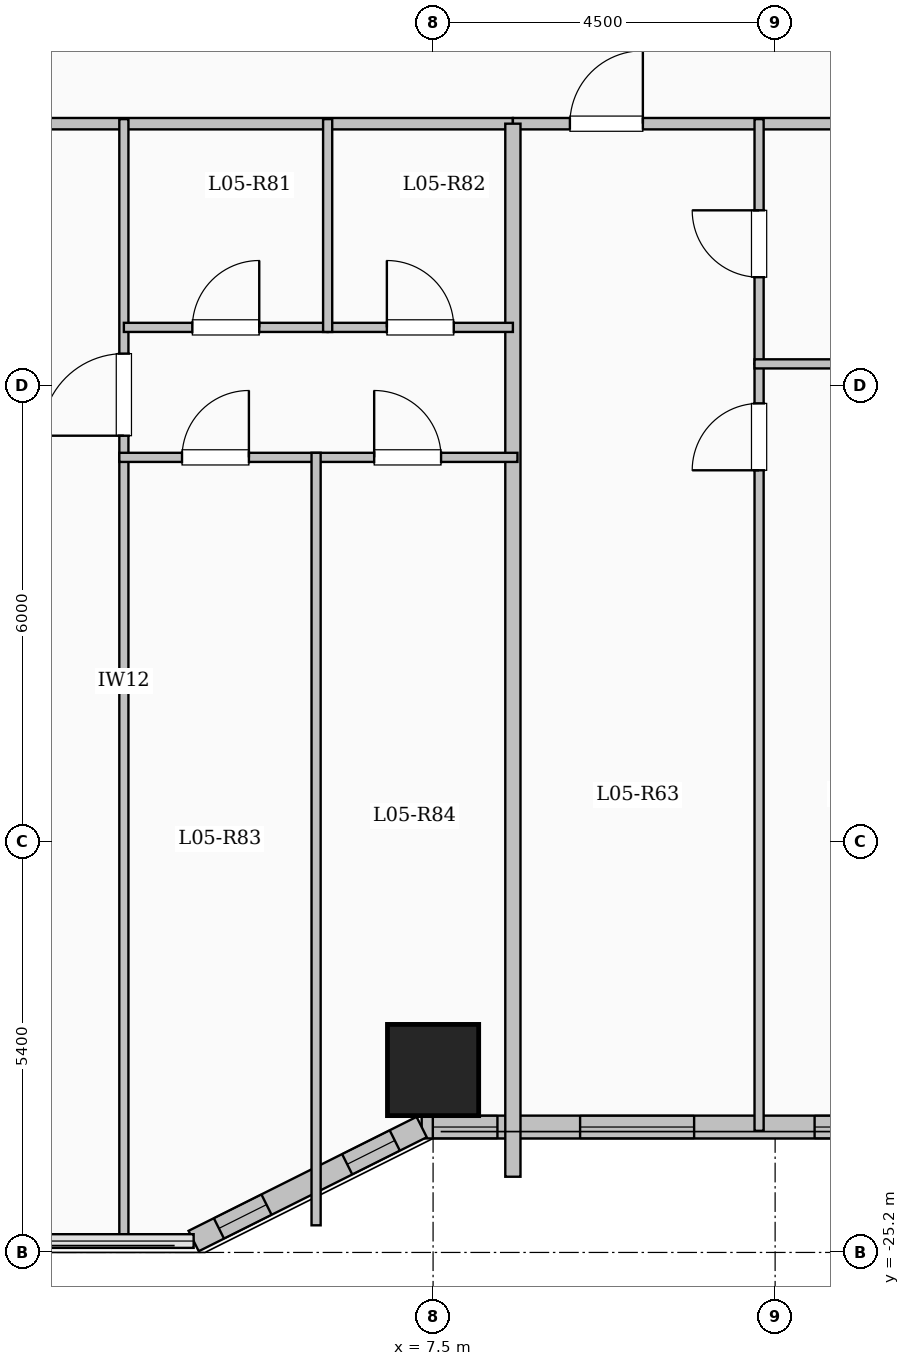
"""IFC4 building model, lengths in metres.
Left out: names, types, materials, properties, quantities, classifications, styles, units other than length and angle.
Written with IfcOpenShell. Run it as: python <this file> out.ifc"""

import sys

from ifc_helpers import new_model, si_unit, direction, frame, frame_2d, origin, origin_2d, place, context, subcontext, project, spatial, rectangle, extrude, element, fill, save


model = new_model("IFC4")
c1 = context("Model", 3, precision=1e-05, world=origin(), true_north=direction((0.0, 1.0)))
c2 = subcontext(c1, "Body", "Model", "MODEL_VIEW")
j1 = project(units=[si_unit("LENGTHUNIT", "METRE"), si_unit("PLANEANGLEUNIT", "RADIAN")], contexts=[c1])
p1 = place(None, origin())
s1 = spatial("IfcSite", under=j1, at=p1, CompositionType="ELEMENT")
p2 = place(p1, origin())
s2 = spatial("IfcBuilding", under=s1, at=p2, CompositionType="ELEMENT")
p3 = place(p2, frame((0.0, 0.0, 24.0)))
s3 = spatial("IfcBuildingStorey", under=s2, at=p3, CompositionType="ELEMENT", Elevation=24.0)
p4 = place(p3, frame((7.5, -22.8, 0.0), z_axis=(0.0, 0.0, 1.0), x_axis=(1.0, 0.0, 0.0)))
e1 = element("IfcColumn", 1, at=p4, inside=s3, PredefinedType="COLUMN", context=c2, shape_type="SweptSolid", body=[
    extrude(rectangle(XDim=1.2, YDim=1.2, at=origin_2d()), origin(), (0.0, 0.0, 1.0), 3.35),
])
p5 = place(p3, frame((22.65, -23.55, 0.0), z_axis=(0.0, 0.0, 1.0), x_axis=(-1.0, 0.0, 0.0)))
e2 = element("IfcWall", 2, at=p5, inside=s3, PredefinedType="SOLIDWALL", context=c2, shape_type="SweptSolid", body=[
    extrude(rectangle(XDim=15.3, YDim=0.3, at=frame_2d((7.65, 0.0))), origin(), (0.0, 0.0, 1.0), 3.1),
])
p6 = place(p5, frame((0.321, 0.0, 0.95)))
e3 = element("IfcOpeningElement", 3, at=p6, cuts=e2, PredefinedType="OPENING", context=c2, shape_type="SweptSolid", body=[
    extrude(rectangle(XDim=1.0, YDim=1.5, at=frame_2d((0.5, 0.75))), frame((0.0, 0.16, 0.0), z_axis=(0.0, -1.0, 0.0), x_axis=(1.0, 0.0, 0.0)), (0.0, 0.0, 1.0), 0.32),
])
p7 = place(p5, frame((2.031, 0.0, 0.95)))
e4 = element("IfcOpeningElement", 4, at=p7, cuts=e2, PredefinedType="OPENING", context=c2, shape_type="SweptSolid", body=[
    extrude(rectangle(XDim=0.85, YDim=1.5, at=frame_2d((0.425, 0.75))), frame((0.0, 0.16, 0.0), z_axis=(0.0, -1.0, 0.0), x_axis=(1.0, 0.0, 0.0)), (0.0, 0.0, 1.0), 0.32),
])
p8 = place(p5, frame((3.562, 0.0, 0.95)))
e5 = element("IfcOpeningElement", 5, at=p8, cuts=e2, PredefinedType="OPENING", context=c2, shape_type="SweptSolid", body=[
    extrude(rectangle(XDim=0.85, YDim=1.5, at=frame_2d((0.425, 0.75))), frame((0.0, 0.16, 0.0), z_axis=(0.0, -1.0, 0.0), x_axis=(1.0, 0.0, 0.0)), (0.0, 0.0, 1.0), 0.32),
])
p9 = place(p5, frame((5.571, 0.0, 0.9)))
e6 = element("IfcOpeningElement", 6, at=p9, cuts=e2, PredefinedType="OPENING", context=c2, shape_type="SweptSolid", body=[
    extrude(rectangle(XDim=1.5, YDim=1.65, at=frame_2d((0.75, 0.825))), frame((0.0, 0.16, 0.0), z_axis=(0.0, -1.0, 0.0), x_axis=(1.0, 0.0, 0.0)), (0.0, 0.0, 1.0), 0.32),
])
p10 = place(p5, frame((8.631, 0.0, 0.9)))
e7 = element("IfcOpeningElement", 7, at=p10, cuts=e2, PredefinedType="OPENING", context=c2, shape_type="SweptSolid", body=[
    extrude(rectangle(XDim=1.5, YDim=1.65, at=frame_2d((0.75, 0.825))), frame((0.0, 0.16, 0.0), z_axis=(0.0, -1.0, 0.0), x_axis=(1.0, 0.0, 0.0)), (0.0, 0.0, 1.0), 0.32),
])
p11 = place(p5, frame((11.716, 0.0, 0.9)))
e8 = element("IfcOpeningElement", 8, at=p11, cuts=e2, PredefinedType="OPENING", context=c2, shape_type="SweptSolid", body=[
    extrude(rectangle(XDim=1.5, YDim=1.65, at=frame_2d((0.75, 0.825))), frame((0.0, 0.16, 0.0), z_axis=(0.0, -1.0, 0.0), x_axis=(1.0, 0.0, 0.0)), (0.0, 0.0, 1.0), 0.32),
])
p12 = place(p5, frame((14.303, 0.0, 0.95)))
e9 = element("IfcOpeningElement", 9, at=p12, cuts=e2, PredefinedType="OPENING", context=c2, shape_type="SweptSolid", body=[
    extrude(rectangle(XDim=0.85, YDim=1.5, at=frame_2d((0.425, 0.75))), frame((0.0, 0.16, 0.0), z_axis=(0.0, -1.0, 0.0), x_axis=(1.0, 0.0, 0.0)), (0.0, 0.0, 1.0), 0.32),
])
p13 = place(p3, frame((7.35, -23.55, 0.0), z_axis=(0.0, 0.0, 1.0), x_axis=(-0.894427191, -0.4472135955, 0.0)))
e10 = element("IfcWall", 10, at=p13, inside=s3, PredefinedType="SOLIDWALL", context=c2, shape_type="SweptSolid", body=[
    extrude(rectangle(XDim=3.354, YDim=0.3, at=frame_2d((1.677, 0.0))), origin(), (0.0, 0.0, 1.0), 3.1),
])
p14 = place(p13, frame((0.396, 0.0, 0.95)))
e11 = element("IfcOpeningElement", 11, at=p14, cuts=e10, PredefinedType="OPENING", context=c2, shape_type="SweptSolid", body=[
    extrude(rectangle(XDim=0.7, YDim=1.5, at=frame_2d((0.35, 0.75))), frame((0.0, 0.16, 0.0), z_axis=(0.0, -1.0, 0.0), x_axis=(1.0, 0.0, 0.0)), (0.0, 0.0, 1.0), 0.32),
])
p15 = place(p13, frame((2.282, 0.0, 0.95)))
e12 = element("IfcOpeningElement", 12, at=p15, cuts=e10, PredefinedType="OPENING", context=c2, shape_type="SweptSolid", body=[
    extrude(rectangle(XDim=0.7, YDim=1.5, at=frame_2d((0.35, 0.75))), frame((0.0, 0.16, 0.0), z_axis=(0.0, -1.0, 0.0), x_axis=(1.0, 0.0, 0.0)), (0.0, 0.0, 1.0), 0.32),
])
p16 = place(p3, frame((-8.55, -10.35, 0.0), z_axis=(0.0, 0.0, 1.0), x_axis=(1.0, 0.0, 0.0)))
e13 = element("IfcWall", 13, at=p16, inside=s3, PredefinedType="PARTITIONING", context=c2, shape_type="SweptSolid", body=[
    extrude(rectangle(XDim=17.1, YDim=0.15, at=frame_2d((8.55, 0.0))), origin(), (0.0, 0.0, 1.0), 3.1),
])
p17 = place(p16, frame((0.8, 0.0, 0.0)))
e14 = element("IfcOpeningElement", 14, at=p17, cuts=e13, PredefinedType="OPENING", context=c2, shape_type="SweptSolid", body=[
    extrude(rectangle(XDim=0.96, YDim=2.15, at=frame_2d((0.48, 1.075))), frame((0.0, 0.085, 0.0), z_axis=(0.0, -1.0, 0.0), x_axis=(1.0, 0.0, 0.0)), (0.0, 0.0, 1.0), 0.17),
])
p18 = place(p16, frame((9.35, 0.0, 0.0)))
e15 = element("IfcOpeningElement", 15, at=p18, cuts=e13, PredefinedType="OPENING", context=c2, shape_type="SweptSolid", body=[
    extrude(rectangle(XDim=0.96, YDim=2.15, at=frame_2d((0.48, 1.075))), frame((0.0, 0.085, 0.0), z_axis=(0.0, -1.0, 0.0), x_axis=(1.0, 0.0, 0.0)), (0.0, 0.0, 1.0), 0.17),
])
p19 = place(p3, frame((8.55, -10.35, 0.0), z_axis=(0.0, 0.0, 1.0), x_axis=(1.0, 0.0, 0.0)))
e16 = element("IfcWall", 16, at=p19, inside=s3, PredefinedType="PARTITIONING", context=c2, shape_type="SweptSolid", body=[
    extrude(rectangle(XDim=14.0, YDim=0.15, at=frame_2d((7.0, 0.0))), origin(), (0.0, 0.0, 1.0), 3.1),
])
p20 = place(p19, frame((0.75, 0.0, 0.0)))
e17 = element("IfcOpeningElement", 17, at=p20, cuts=e16, PredefinedType="OPENING", context=c2, shape_type="SweptSolid", body=[
    extrude(rectangle(XDim=0.96, YDim=2.15, at=frame_2d((0.48, 1.075))), frame((0.0, 0.085, 0.0), z_axis=(0.0, -1.0, 0.0), x_axis=(1.0, 0.0, 0.0)), (0.0, 0.0, 1.0), 0.17),
])
p21 = place(p19, frame((6.888, 0.0, 0.0)))
e18 = element("IfcOpeningElement", 18, at=p21, cuts=e16, PredefinedType="OPENING", context=c2, shape_type="SweptSolid", body=[
    extrude(rectangle(XDim=0.96, YDim=2.15, at=frame_2d((0.48, 1.075))), frame((0.0, 0.085, 0.0), z_axis=(0.0, -1.0, 0.0), x_axis=(1.0, 0.0, 0.0)), (0.0, 0.0, 1.0), 0.17),
])
p22 = place(p3, frame((11.789, -23.6, 0.0), z_axis=(0.0, 0.0, 1.0), x_axis=(0.0, 1.0, 0.0)))
e19 = element("IfcWall", 19, at=p22, inside=s3, PredefinedType="PARTITIONING", context=c2, shape_type="SweptSolid", body=[
    extrude(rectangle(XDim=10.09, YDim=0.12, at=frame_2d((5.045, 0.0))), origin(), (0.0, 0.0, 1.0), 3.1),
])
p23 = place(p22, frame((8.69, 0.0, 0.0)))
e20 = element("IfcOpeningElement", 20, at=p23, cuts=e19, PredefinedType="OPENING", context=c2, shape_type="SweptSolid", body=[
    extrude(rectangle(XDim=0.88, YDim=2.1, at=frame_2d((0.44, 1.05))), frame((0.0, 0.07, 0.0), z_axis=(0.0, -1.0, 0.0), x_axis=(1.0, 0.0, 0.0)), (0.0, 0.0, 1.0), 0.14),
])
p24 = place(p3, frame((11.789, -13.51, 0.0), z_axis=(0.0, 0.0, 1.0), x_axis=(0.0, 1.0, 0.0)))
e21 = element("IfcWall", 21, at=p24, inside=s3, PredefinedType="PARTITIONING", context=c2, shape_type="SweptSolid", body=[
    extrude(rectangle(XDim=3.22, YDim=0.12, at=frame_2d((1.61, 0.0))), origin(), (0.0, 0.0, 1.0), 3.1),
])
p25 = place(p24, frame((1.14, 0.0, 0.0)))
e22 = element("IfcOpeningElement", 22, at=p25, cuts=e21, PredefinedType="OPENING", context=c2, shape_type="SweptSolid", body=[
    extrude(rectangle(XDim=0.88, YDim=2.1, at=frame_2d((0.44, 1.05))), frame((0.0, 0.07, 0.0), z_axis=(0.0, -1.0, 0.0), x_axis=(1.0, 0.0, 0.0)), (0.0, 0.0, 1.0), 0.14),
])
p26 = place(p3, frame((11.729, -13.51, 0.0), z_axis=(0.0, 0.0, 1.0), x_axis=(1.0, 0.0, 0.0)))
e23 = element("IfcWall", 23, at=p26, inside=s3, PredefinedType="PARTITIONING", context=c2, shape_type="SweptSolid", body=[
    extrude(rectangle(XDim=3.069, YDim=0.12, at=frame_2d((1.535, 0.0))), origin(), (0.0, 0.0, 1.0), 3.1),
])
p27 = place(p3, frame((8.55, -24.204, 0.0), z_axis=(0.0, 0.0, 1.0), x_axis=(0.0, 1.0, 0.0)))
e24 = element("IfcWall", 24, at=p27, inside=s3, PredefinedType="SOLIDWALL", context=c2, shape_type="SweptSolid", body=[
    extrude(rectangle(XDim=13.854, YDim=0.2, at=frame_2d((6.927, 0.0))), origin(), (0.0, 0.0, 1.0), 3.1),
])
p28 = place(p3, frame((3.432, -25.08, 0.0), z_axis=(0.0, 0.0, 1.0), x_axis=(0.0, 1.0, 0.0)))
e25 = element("IfcWall", 25, at=p28, inside=s3, PredefinedType="PARTITIONING", context=c2, shape_type="SweptSolid", body=[
    extrude(rectangle(XDim=14.79, YDim=0.12, at=frame_2d((7.395, 0.0))), origin(), (0.0, 0.0, 1.0), 3.1),
])
p29 = place(p28, frame((10.625, 0.0, 0.0)))
e26 = element("IfcOpeningElement", 26, at=p29, cuts=e25, PredefinedType="OPENING", context=c2, shape_type="SweptSolid", body=[
    extrude(rectangle(XDim=1.08, YDim=2.15, at=frame_2d((0.54, 1.075))), frame((0.0, 0.07, 0.0), z_axis=(0.0, -1.0, 0.0), x_axis=(1.0, 0.0, 0.0)), (0.0, 0.0, 1.0), 0.14),
])
p30 = place(p3, frame((3.432, -13.03, 0.0), z_axis=(0.0, 0.0, 1.0), x_axis=(1.0, 0.0, 0.0)))
e27 = element("IfcWall", 27, at=p30, inside=s3, PredefinedType="PARTITIONING", context=c2, shape_type="SweptSolid", body=[
    extrude(rectangle(XDim=2.681, YDim=0.12, at=frame_2d((1.341, 0.0))), origin(), (0.0, 0.0, 1.0), 2.585),
])
p31 = place(p30, frame((0.901, 0.0, 0.0)))
e28 = element("IfcOpeningElement", 28, at=p31, cuts=e27, PredefinedType="OPENING", context=c2, shape_type="SweptSolid", body=[
    extrude(rectangle(XDim=0.88, YDim=2.1, at=frame_2d((0.44, 1.05))), frame((0.0, 0.07, 0.0), z_axis=(0.0, -1.0, 0.0), x_axis=(1.0, 0.0, 0.0)), (0.0, 0.0, 1.0), 0.14),
])
p32 = place(p3, frame((6.113, -13.03, 0.0), z_axis=(0.0, 0.0, 1.0), x_axis=(1.0, 0.0, 0.0)))
e29 = element("IfcWall", 29, at=p32, inside=s3, PredefinedType="PARTITIONING", context=c2, shape_type="SweptSolid", body=[
    extrude(rectangle(XDim=2.437, YDim=0.12, at=frame_2d((1.219, 0.0))), origin(), (0.0, 0.0, 1.0), 2.585),
])
p33 = place(p32, frame((0.779, 0.0, 0.0)))
e30 = element("IfcOpeningElement", 30, at=p33, cuts=e29, PredefinedType="OPENING", context=c2, shape_type="SweptSolid", body=[
    extrude(rectangle(XDim=0.88, YDim=2.1, at=frame_2d((0.44, 1.05))), frame((0.0, 0.07, 0.0), z_axis=(0.0, -1.0, 0.0), x_axis=(1.0, 0.0, 0.0)), (0.0, 0.0, 1.0), 0.14),
])
p34 = place(p3, frame((3.372, -14.74, 0.0), z_axis=(0.0, 0.0, 1.0), x_axis=(1.0, 0.0, 0.0)))
e31 = element("IfcWall", 31, at=p34, inside=s3, PredefinedType="PARTITIONING", context=c2, shape_type="SweptSolid", body=[
    extrude(rectangle(XDim=5.238, YDim=0.12, at=frame_2d((2.619, 0.0))), origin(), (0.0, 0.0, 1.0), 2.585),
])
p35 = place(p34, frame((0.825, 0.0, 0.0)))
e32 = element("IfcOpeningElement", 32, at=p35, cuts=e31, PredefinedType="OPENING", context=c2, shape_type="SweptSolid", body=[
    extrude(rectangle(XDim=0.88, YDim=2.1, at=frame_2d((0.44, 1.05))), frame((0.0, 0.07, 0.0), z_axis=(0.0, -1.0, 0.0), x_axis=(1.0, 0.0, 0.0)), (0.0, 0.0, 1.0), 0.14),
])
p36 = place(p34, frame((3.353, 0.0, 0.0)))
e33 = element("IfcOpeningElement", 33, at=p36, cuts=e31, PredefinedType="OPENING", context=c2, shape_type="SweptSolid", body=[
    extrude(rectangle(XDim=0.88, YDim=2.1, at=frame_2d((0.44, 1.05))), frame((0.0, 0.07, 0.0), z_axis=(0.0, -1.0, 0.0), x_axis=(1.0, 0.0, 0.0)), (0.0, 0.0, 1.0), 0.14),
])
p37 = place(p3, frame((6.113, -13.09, 0.0), z_axis=(0.0, 0.0, 1.0), x_axis=(0.0, 1.0, 0.0)))
e34 = element("IfcWall", 34, at=p37, inside=s3, PredefinedType="PARTITIONING", context=c2, shape_type="SweptSolid", body=[
    extrude(rectangle(XDim=2.8, YDim=0.12, at=frame_2d((1.4, 0.0))), origin(), (0.0, 0.0, 1.0), 3.1),
])
p38 = place(p3, frame((5.961, -24.843, 0.0), z_axis=(0.0, 0.0, 1.0), x_axis=(0.0, 1.0, 0.0)))
e35 = element("IfcWall", 35, at=p38, inside=s3, PredefinedType="PARTITIONING", context=c2, shape_type="SweptSolid", body=[
    extrude(rectangle(XDim=10.163, YDim=0.12, at=frame_2d((5.082, 0.0))), origin(), (0.0, 0.0, 1.0), 3.1),
])
p39 = place(p10, origin())
e36 = element("IfcWindow", 36, at=p39, inside=s3, PartitioningType="SINGLE_PANEL", PredefinedType="WINDOW", context=c2, shape_type="SweptSolid", body=[
    extrude(rectangle(XDim=1.5, YDim=1.65, at=frame_2d((0.75, 0.825))), frame((0.0, 0.03, 0.0), z_axis=(0.0, -1.0, 0.0), x_axis=(1.0, 0.0, 0.0)), (0.0, 0.0, 1.0), 0.06),
])
fill(e7, e36)
p40 = place(p11, origin())
e37 = element("IfcWindow", 37, at=p40, inside=s3, PartitioningType="SINGLE_PANEL", PredefinedType="WINDOW", context=c2, shape_type="SweptSolid", body=[
    extrude(rectangle(XDim=1.5, YDim=1.65, at=frame_2d((0.75, 0.825))), frame((0.0, 0.03, 0.0), z_axis=(0.0, -1.0, 0.0), x_axis=(1.0, 0.0, 0.0)), (0.0, 0.0, 1.0), 0.06),
])
fill(e8, e37)
p41 = place(p12, origin())
e38 = element("IfcWindow", 38, at=p41, inside=s3, PartitioningType="SINGLE_PANEL", PredefinedType="WINDOW", context=c2, shape_type="SweptSolid", body=[
    extrude(rectangle(XDim=0.85, YDim=1.5, at=frame_2d((0.425, 0.75))), frame((0.0, 0.03, 0.0), z_axis=(0.0, -1.0, 0.0), x_axis=(1.0, 0.0, 0.0)), (0.0, 0.0, 1.0), 0.06),
])
fill(e9, e38)
p42 = place(p14, origin())
e39 = element("IfcWindow", 39, at=p42, inside=s3, PartitioningType="SINGLE_PANEL", PredefinedType="WINDOW", context=c2, shape_type="SweptSolid", body=[
    extrude(rectangle(XDim=0.7, YDim=1.5, at=frame_2d((0.35, 0.75))), frame((0.0, 0.03, 0.0), z_axis=(0.0, -1.0, 0.0), x_axis=(1.0, 0.0, 0.0)), (0.0, 0.0, 1.0), 0.06),
])
fill(e11, e39)
p43 = place(p15, origin())
e40 = element("IfcWindow", 40, at=p43, inside=s3, PartitioningType="SINGLE_PANEL", PredefinedType="WINDOW", context=c2, shape_type="SweptSolid", body=[
    extrude(rectangle(XDim=0.7, YDim=1.5, at=frame_2d((0.35, 0.75))), frame((0.0, 0.03, 0.0), z_axis=(0.0, -1.0, 0.0), x_axis=(1.0, 0.0, 0.0)), (0.0, 0.0, 1.0), 0.06),
])
fill(e12, e40)
p44 = place(p20, origin())
e41 = element("IfcDoor", 41, at=p44, inside=s3, OperationType="SINGLE_SWING_RIGHT", PredefinedType="DOOR", context=c2, shape_type="SweptSolid", body=[
    extrude(rectangle(XDim=0.96, YDim=2.15, at=frame_2d((0.48, 1.075))), frame((0.0, 0.025, 0.0), z_axis=(0.0, -1.0, 0.0), x_axis=(1.0, 0.0, 0.0)), (0.0, 0.0, 1.0), 0.05),
])
fill(e17, e41)
p45 = place(p23, origin())
e42 = element("IfcDoor", 42, at=p45, inside=s3, OperationType="SINGLE_SWING_LEFT", PredefinedType="DOOR", context=c2, shape_type="SweptSolid", body=[
    extrude(rectangle(XDim=0.88, YDim=2.1, at=frame_2d((0.44, 1.05))), frame((0.0, 0.025, 0.0), z_axis=(0.0, -1.0, 0.0), x_axis=(1.0, 0.0, 0.0)), (0.0, 0.0, 1.0), 0.05),
])
fill(e20, e42)
p46 = place(p25, origin())
e43 = element("IfcDoor", 43, at=p46, inside=s3, OperationType="SINGLE_SWING_RIGHT", PredefinedType="DOOR", context=c2, shape_type="SweptSolid", body=[
    extrude(rectangle(XDim=0.88, YDim=2.1, at=frame_2d((0.44, 1.05))), frame((0.0, 0.025, 0.0), z_axis=(0.0, -1.0, 0.0), x_axis=(1.0, 0.0, 0.0)), (0.0, 0.0, 1.0), 0.05),
])
fill(e22, e43)
p47 = place(p29, origin())
e44 = element("IfcDoor", 44, at=p47, inside=s3, OperationType="SINGLE_SWING_LEFT", PredefinedType="DOOR", context=c2, shape_type="SweptSolid", body=[
    extrude(rectangle(XDim=1.08, YDim=2.15, at=frame_2d((0.54, 1.075))), frame((0.0, 0.025, 0.0), z_axis=(0.0, -1.0, 0.0), x_axis=(1.0, 0.0, 0.0)), (0.0, 0.0, 1.0), 0.05),
])
fill(e26, e44)
p48 = place(p31, origin())
e45 = element("IfcDoor", 45, at=p48, inside=s3, OperationType="SINGLE_SWING_RIGHT", PredefinedType="DOOR", context=c2, shape_type="SweptSolid", body=[
    extrude(rectangle(XDim=0.88, YDim=2.1, at=frame_2d((0.44, 1.05))), frame((0.0, 0.025, 0.0), z_axis=(0.0, -1.0, 0.0), x_axis=(1.0, 0.0, 0.0)), (0.0, 0.0, 1.0), 0.05),
])
fill(e28, e45)
p49 = place(p33, origin())
e46 = element("IfcDoor", 46, at=p49, inside=s3, OperationType="SINGLE_SWING_LEFT", PredefinedType="DOOR", context=c2, shape_type="SweptSolid", body=[
    extrude(rectangle(XDim=0.88, YDim=2.1, at=frame_2d((0.44, 1.05))), frame((0.0, 0.025, 0.0), z_axis=(0.0, -1.0, 0.0), x_axis=(1.0, 0.0, 0.0)), (0.0, 0.0, 1.0), 0.05),
])
fill(e30, e46)
p50 = place(p35, origin())
e47 = element("IfcDoor", 47, at=p50, inside=s3, OperationType="SINGLE_SWING_RIGHT", PredefinedType="DOOR", context=c2, shape_type="SweptSolid", body=[
    extrude(rectangle(XDim=0.88, YDim=2.1, at=frame_2d((0.44, 1.05))), frame((0.0, 0.025, 0.0), z_axis=(0.0, -1.0, 0.0), x_axis=(1.0, 0.0, 0.0)), (0.0, 0.0, 1.0), 0.05),
])
fill(e32, e47)
p51 = place(p36, origin())
e48 = element("IfcDoor", 48, at=p51, inside=s3, OperationType="SINGLE_SWING_LEFT", PredefinedType="DOOR", context=c2, shape_type="SweptSolid", body=[
    extrude(rectangle(XDim=0.88, YDim=2.1, at=frame_2d((0.44, 1.05))), frame((0.0, 0.025, 0.0), z_axis=(0.0, -1.0, 0.0), x_axis=(1.0, 0.0, 0.0)), (0.0, 0.0, 1.0), 0.05),
])
fill(e33, e48)
save(model, sys.argv[1])
